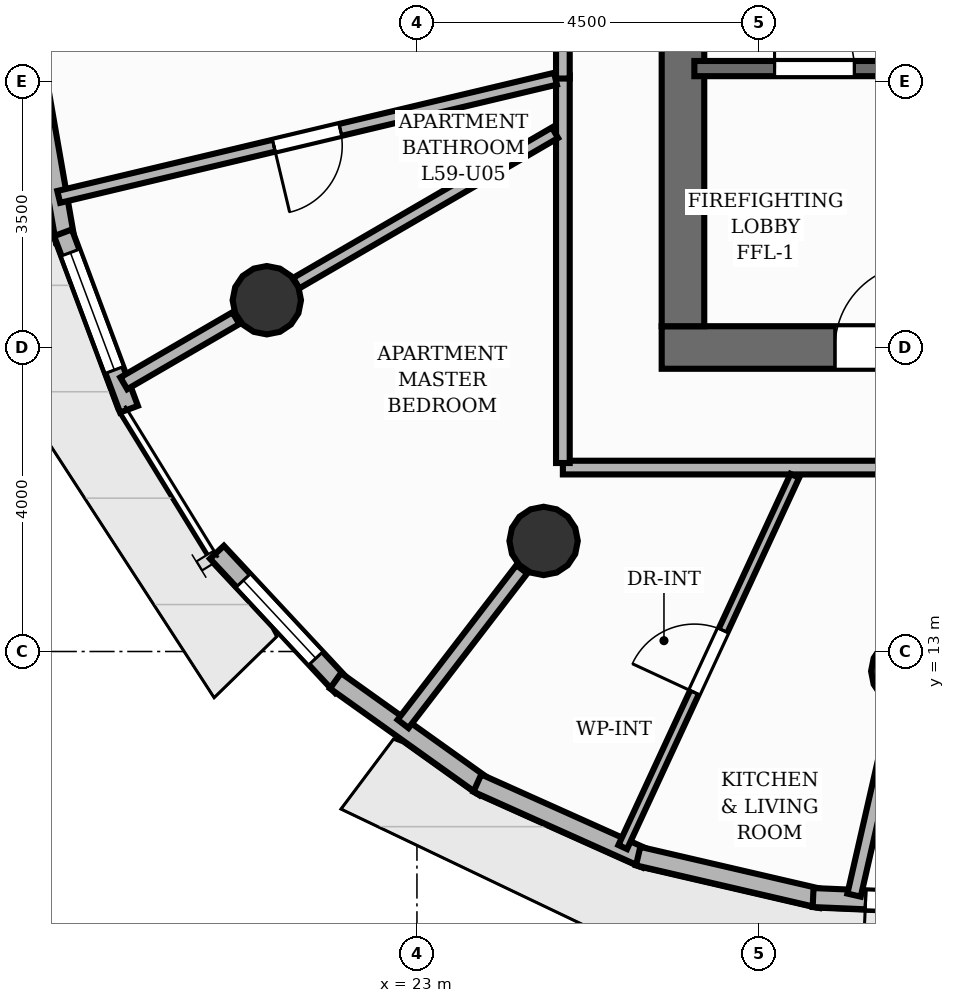
"""IFC4 building model, lengths in metres.
Left out: names, types, materials, properties, quantities, classifications, styles, units other than length and angle.
Written with IfcOpenShell. Run it as: python <this file> out.ifc"""

import sys

from ifc_helpers import new_model, si_unit, direction, frame, frame_2d, origin, origin_2d, place, context, subcontext, project, spatial, rectangle, circle, extrude, element, fill, save


model = new_model("IFC4")
c1 = context("Model", 3, precision=1e-05, world=origin(), true_north=direction((0.0, 1.0)))
c2 = subcontext(c1, "Body", "Model", "MODEL_VIEW")
j1 = project(units=[si_unit("LENGTHUNIT", "METRE"), si_unit("PLANEANGLEUNIT", "RADIAN")], contexts=[c1])
p1 = place(None, origin())
s1 = spatial("IfcSite", under=j1, at=p1, CompositionType="ELEMENT")
p2 = place(p1, origin())
s2 = spatial("IfcBuilding", under=s1, at=p2, CompositionType="ELEMENT")
p3 = place(p2, frame((0.0, 0.0, 198.24)))
s3 = spatial("IfcBuildingStorey", under=s2, at=p3, CompositionType="ELEMENT", Elevation=198.24)
p4 = place(p3, frame((26.22, 17.0, 0.0), z_axis=(0.0, 0.0, 1.0), x_axis=(1.0, 0.0, 0.0)))
e1 = element("IfcWall", 1, at=p4, inside=s3, PredefinedType="SHEAR", context=c2, shape_type="SweptSolid", body=[
    extrude(rectangle(XDim=11.56, YDim=0.56, at=frame_2d((5.78, 0.0))), origin(), (0.0, 0.0, 1.0), 3.2),
])
p5 = place(p4, frame((2.28, 0.0, 0.0)))
e2 = element("IfcOpeningElement", 2, at=p5, cuts=e1, PredefinedType="OPENING", context=c2, shape_type="SweptSolid", body=[
    extrude(rectangle(XDim=1.1, YDim=2.15, at=frame_2d((0.55, 1.075))), frame((0.0, 0.29, 0.0), z_axis=(0.0, -1.0, 0.0), x_axis=(1.0, 0.0, 0.0)), (0.0, 0.0, 1.0), 0.58),
])
p6 = place(p4, frame((5.83, 0.0, 0.0)))
e3 = element("IfcOpeningElement", 3, at=p6, cuts=e1, PredefinedType="OPENING", context=c2, shape_type="SweptSolid", body=[
    extrude(rectangle(XDim=0.9, YDim=2.1, at=frame_2d((0.45, 1.05))), frame((0.0, 0.29, 0.0), z_axis=(0.0, -1.0, 0.0), x_axis=(1.0, 0.0, 0.0)), (0.0, 0.0, 1.0), 0.58),
])
p7 = place(p3, frame((26.5, 17.28, 0.0), z_axis=(0.0, 0.0, 1.0), x_axis=(0.0, 1.0, 0.0)))
e4 = element("IfcWall", 4, at=p7, inside=s3, PredefinedType="SHEAR", context=c2, shape_type="SweptSolid", body=[
    extrude(rectangle(XDim=13.44, YDim=0.56, at=frame_2d((6.72, 0.0))), origin(), (0.0, 0.0, 1.0), 3.2),
])
for number, where, z_axis, x_axis in (
    (5, (21.025, 17.622, 0.0), (0.0, 0.0, 1.0), (1.0, 0.0, 0.0)),
    (6, (24.667, 14.455, 0.0), (0.0, 0.0, 1.0), (1.0, 0.0, 0.0)),
    (7, (29.425, 12.74, 0.0), (0.0, 0.0, 1.0), (1.0, 0.0, 0.0)),
):
    element("IfcColumn", number, at=place(p3, frame(where, z_axis=z_axis, x_axis=x_axis)), inside=s3, PredefinedType="COLUMN", context=c2, shape_type="SweptSolid", body=[
        extrude(circle(Radius=0.45, at=origin_2d()), origin(), (0.0, 0.0, 1.0), 3.2),
    ])
p8 = place(p3, frame((18.373, 18.4, 0.0), z_axis=(0.0, 0.0, 1.0), x_axis=(-0.17143069214, 0.985196182388, 0.0)))
e8 = element("IfcWall", 8, at=p8, inside=s3, PredefinedType="SOLIDWALL", context=c2, shape_type="SweptSolid", body=[
    extrude(rectangle(XDim=2.532, YDim=0.25, at=frame_2d((1.266, 0.0))), origin(), (0.0, 0.0, 1.0), 2.96),
])
p9 = place(p3, frame((19.211, 16.189, 0.0), z_axis=(0.0, 0.0, 1.0), x_axis=(-0.350367491805, 0.93661231077, 0.0)))
e9 = element("IfcWall", 9, at=p9, inside=s3, PredefinedType="SOLIDWALL", context=c2, shape_type="SweptSolid", body=[
    extrude(rectangle(XDim=2.478, YDim=0.25, at=frame_2d((1.239, 0.0))), origin(), (0.0, 0.0, 1.0), 2.96),
])
p10 = place(p9, frame((0.55, 0.0, 0.85)))
e10 = element("IfcOpeningElement", 10, at=p10, cuts=e9, PredefinedType="OPENING", context=c2, shape_type="SweptSolid", body=[
    extrude(rectangle(XDim=1.65, YDim=1.52, at=frame_2d((0.825, 0.76))), frame((0.0, 0.135, 0.0), z_axis=(0.0, -1.0, 0.0), x_axis=(1.0, 0.0, 0.0)), (0.0, 0.0, 1.0), 0.27),
])
p11 = place(p3, frame((22.015, 12.539, 0.0), z_axis=(0.0, 0.0, 1.0), x_axis=(-0.681640731319, 0.731687032417, 0.0)))
e11 = element("IfcWall", 11, at=p11, inside=s3, PredefinedType="SOLIDWALL", context=c2, shape_type="SweptSolid", body=[
    extrude(rectangle(XDim=2.415, YDim=0.25, at=frame_2d((1.208, 0.0))), origin(), (0.0, 0.0, 1.0), 2.96),
])
p12 = place(p11, frame((0.507, 0.0, 0.85)))
e12 = element("IfcOpeningElement", 12, at=p12, cuts=e11, PredefinedType="OPENING", context=c2, shape_type="SweptSolid", body=[
    extrude(rectangle(XDim=1.4, YDim=1.55, at=frame_2d((0.7, 0.775))), frame((0.0, 0.135, 0.0), z_axis=(0.0, -1.0, 0.0), x_axis=(1.0, 0.0, 0.0)), (0.0, 0.0, 1.0), 0.27),
])
p13 = place(p3, frame((23.894, 11.212, 0.0), z_axis=(0.0, 0.0, 1.0), x_axis=(-0.813794949485, 0.581152114504, 0.0)))
e13 = element("IfcWall", 13, at=p13, inside=s3, PredefinedType="SOLIDWALL", context=c2, shape_type="SweptSolid", body=[
    extrude(rectangle(XDim=2.415, YDim=0.25, at=frame_2d((1.208, 0.0))), origin(), (0.0, 0.0, 1.0), 2.96),
])
p14 = place(p3, frame((26.018, 10.271, 0.0), z_axis=(0.0, 0.0, 1.0), x_axis=(-0.912451283158, 0.409185356365, 0.0)))
e14 = element("IfcWall", 14, at=p14, inside=s3, PredefinedType="SOLIDWALL", context=c2, shape_type="SweptSolid", body=[
    extrude(rectangle(XDim=2.437, YDim=0.25, at=frame_2d((1.218, 0.0))), origin(), (0.0, 0.0, 1.0), 2.96),
])
p15 = place(p3, frame((28.324, 9.747, 0.0), z_axis=(0.0, 0.0, 1.0), x_axis=(-0.974096425092, 0.226133046286, 0.0)))
e15 = element("IfcWall", 15, at=p15, inside=s3, PredefinedType="SOLIDWALL", context=c2, shape_type="SweptSolid", body=[
    extrude(rectangle(XDim=2.478, YDim=0.25, at=frame_2d((1.239, 0.0))), origin(), (0.0, 0.0, 1.0), 2.96),
])
p16 = place(p3, frame((30.742, 9.655, 0.0), z_axis=(0.0, 0.0, 1.0), x_axis=(-0.999099670747, 0.042424614469, 0.0)))
e16 = element("IfcWall", 16, at=p16, inside=s3, PredefinedType="SOLIDWALL", context=c2, shape_type="SweptSolid", body=[
    extrude(rectangle(XDim=2.532, YDim=0.25, at=frame_2d((1.266, 0.0))), origin(), (0.0, 0.0, 1.0), 2.96),
])
p17 = place(p16, frame((0.691, 0.0, 0.0)))
e17 = element("IfcOpeningElement", 17, at=p17, cuts=e16, PredefinedType="OPENING", context=c2, shape_type="SweptSolid", body=[
    extrude(rectangle(XDim=1.15, YDim=2.2, at=frame_2d((0.575, 1.1))), frame((0.0, 0.135, 0.0), z_axis=(0.0, -1.0, 0.0), x_axis=(1.0, 0.0, 0.0)), (0.0, 0.0, 1.0), 0.27),
])
p18 = place(p3, frame((26.65, 20.67, 0.0), z_axis=(0.0, 0.0, 1.0), x_axis=(1.0, 0.0, 0.0)))
e18 = element("IfcWall", 18, at=p18, inside=s3, PredefinedType="SHEAR", context=c2, shape_type="SweptSolid", body=[
    extrude(rectangle(XDim=3.24, YDim=0.2, at=frame_2d((1.62, 0.0))), origin(), (0.0, 0.0, 1.0), 3.2),
])
p19 = place(p18, frame((1.055, 0.0, 0.0)))
e19 = element("IfcOpeningElement", 19, at=p19, cuts=e18, PredefinedType="OPENING", context=c2, shape_type="SweptSolid", body=[
    extrude(rectangle(XDim=1.05, YDim=2.15, at=frame_2d((0.525, 1.075))), frame((0.0, 0.11, 0.0), z_axis=(0.0, -1.0, 0.0), x_axis=(1.0, 0.0, 0.0)), (0.0, 0.0, 1.0), 0.22),
])
p20 = place(p3, frame((20.618, 17.386, 0.0), z_axis=(0.0, 0.0, 1.0), x_axis=(-0.864618511529, -0.502428929821, 0.0)))
e20 = element("IfcWall", 20, at=p20, inside=s3, PredefinedType="PARTITIONING", context=c2, shape_type="SweptSolid", body=[
    extrude(rectangle(XDim=1.706, YDim=0.18, at=frame_2d((0.853, 0.0))), origin(), (0.0, 0.0, 1.0), 2.403),
])
p21 = place(p3, frame((24.38, 14.082, 0.0), z_axis=(0.0, 0.0, 1.0), x_axis=(-0.60921849036, -0.79300241551, 0.0)))
e21 = element("IfcWall", 21, at=p21, inside=s3, PredefinedType="PARTITIONING", context=c2, shape_type="SweptSolid", body=[
    extrude(rectangle(XDim=2.565, YDim=0.18, at=frame_2d((1.283, 0.0))), origin(), (0.0, 0.0, 1.0), 2.403),
])
p22 = place(p3, frame((29.32, 12.282, 0.0), z_axis=(0.0, 0.0, 1.0), x_axis=(-0.22299363946, -0.974819899654, 0.0)))
e22 = element("IfcWall", 22, at=p22, inside=s3, PredefinedType="PARTITIONING", context=c2, shape_type="SweptSolid", body=[
    extrude(rectangle(XDim=2.552, YDim=0.18, at=frame_2d((1.276, 0.0))), origin(), (0.0, 0.0, 1.0), 2.403),
])
p23 = place(p3, frame((39.08, 15.42, 0.0), z_axis=(0.0, 0.0, 1.0), x_axis=(-1.0, 0.0, 0.0)))
e23 = element("IfcWall", 23, at=p23, inside=s3, PredefinedType="PARTITIONING", context=c2, shape_type="SweptSolid", body=[
    extrude(rectangle(XDim=14.16, YDim=0.18, at=frame_2d((7.08, 0.0))), origin(), (0.0, 0.0, 1.0), 2.955),
])
p24 = place(p23, frame((8.155, 0.0, 0.0)))
e24 = element("IfcOpeningElement", 24, at=p24, cuts=e23, PredefinedType="OPENING", context=c2, shape_type="SweptSolid", body=[
    extrude(rectangle(XDim=1.05, YDim=2.15, at=frame_2d((0.525, 1.075))), frame((0.0, 0.1, 0.0), z_axis=(0.0, -1.0, 0.0), x_axis=(1.0, 0.0, 0.0)), (0.0, 0.0, 1.0), 0.2),
])
p25 = place(p3, frame((24.92, 15.48, 0.0), z_axis=(0.0, 0.0, 1.0), x_axis=(0.0, 1.0, 0.0)))
e25 = element("IfcWall", 25, at=p25, inside=s3, PredefinedType="PARTITIONING", context=c2, shape_type="SweptSolid", body=[
    extrude(rectangle(XDim=5.1, YDim=0.18, at=frame_2d((2.55, 0.0))), origin(), (0.0, 0.0, 1.0), 2.955),
])
p26 = place(p3, frame((24.92, 20.539, 0.0), z_axis=(0.0, 0.0, 1.0), x_axis=(0.0, 1.0, 0.0)))
e26 = element("IfcWall", 26, at=p26, inside=s3, PredefinedType="PARTITIONING", context=c2, shape_type="SweptSolid", body=[
    extrude(rectangle(XDim=1.061, YDim=0.18, at=frame_2d((0.531, 0.0))), origin(), (0.0, 0.0, 1.0), 2.955),
])
p27 = place(p3, frame((25.708, 10.427, 0.0), z_axis=(0.0, 0.0, 1.0), x_axis=(0.420587579127, 0.907251943114, 0.0)))
e27 = element("IfcWall", 27, at=p27, inside=s3, PredefinedType="PARTITIONING", context=c2, shape_type="SweptSolid", body=[
    extrude(rectangle(XDim=5.383, YDim=0.125, at=frame_2d((2.692, 0.0))), origin(), (0.0, 0.0, 1.0), 2.955),
])
p28 = place(p27, frame((2.242, 0.0, 0.0)))
e28 = element("IfcOpeningElement", 28, at=p28, cuts=e27, PredefinedType="OPENING", context=c2, shape_type="SweptSolid", body=[
    extrude(rectangle(XDim=0.9, YDim=2.1, at=frame_2d((0.45, 1.05))), frame((0.0, 0.073, 0.0), z_axis=(0.0, -1.0, 0.0), x_axis=(1.0, 0.0, 0.0)), (0.0, 0.0, 1.0), 0.145),
])
p29 = place(p3, frame((21.412, 17.847, 0.0), z_axis=(0.0, 0.0, 1.0), x_axis=(0.864603029318, 0.502455571861, 0.0)))
e29 = element("IfcWall", 29, at=p29, inside=s3, PredefinedType="PLUMBINGWALL", context=c2, shape_type="SweptSolid", body=[
    extrude(rectangle(XDim=3.938, YDim=0.16, at=frame_2d((1.969, 0.0))), origin(), (0.0, 0.0, 1.0), 2.403),
])
p30 = place(p3, frame((24.823, 20.536, 0.0), z_axis=(0.0, 0.0, 1.0), x_axis=(-0.972855711428, -0.231412542317, 0.0)))
e30 = element("IfcWall", 30, at=p30, inside=s3, PredefinedType="PLUMBINGWALL", context=c2, shape_type="SweptSolid", body=[
    extrude(rectangle(XDim=6.718, YDim=0.16, at=frame_2d((3.359, 0.0))), origin(), (0.0, 0.0, 1.0), 2.692),
])
p31 = place(p30, frame((2.909, 0.0, 0.0)))
e31 = element("IfcOpeningElement", 31, at=p31, cuts=e30, PredefinedType="OPENING", context=c2, shape_type="SweptSolid", body=[
    extrude(rectangle(XDim=0.9, YDim=2.1, at=frame_2d((0.45, 1.05))), frame((0.0, 0.09, 0.0), z_axis=(0.0, -1.0, 0.0), x_axis=(1.0, 0.0, 0.0)), (0.0, 0.0, 1.0), 0.18),
])
p32 = place(p17, origin())
e32 = element("IfcDoor", 32, at=p32, inside=s3, OperationType="SINGLE_SWING_RIGHT", PredefinedType="DOOR", context=c2, shape_type="SweptSolid", body=[
    extrude(rectangle(XDim=1.15, YDim=2.2, at=frame_2d((0.575, 1.1))), frame((0.0, 0.025, 0.0), z_axis=(0.0, -1.0, 0.0), x_axis=(1.0, 0.0, 0.0)), (0.0, 0.0, 1.0), 0.05),
])
fill(e17, e32)
p33 = place(p10, origin())
e33 = element("IfcWindow", 33, at=p33, inside=s3, PartitioningType="SINGLE_PANEL", PredefinedType="WINDOW", context=c2, shape_type="SweptSolid", body=[
    extrude(rectangle(XDim=1.65, YDim=1.52, at=frame_2d((0.825, 0.76))), frame((0.0, 0.03, 0.0), z_axis=(0.0, -1.0, 0.0), x_axis=(1.0, 0.0, 0.0)), (0.0, 0.0, 1.0), 0.06),
])
fill(e10, e33)
p34 = place(p12, origin())
e34 = element("IfcWindow", 34, at=p34, inside=s3, PartitioningType="SINGLE_PANEL", PredefinedType="WINDOW", context=c2, shape_type="SweptSolid", body=[
    extrude(rectangle(XDim=1.4, YDim=1.55, at=frame_2d((0.7, 0.775))), frame((0.0, 0.03, 0.0), z_axis=(0.0, -1.0, 0.0), x_axis=(1.0, 0.0, 0.0)), (0.0, 0.0, 1.0), 0.06),
])
fill(e12, e34)
p35 = place(p19, origin())
e35 = element("IfcDoor", 35, at=p35, inside=s3, OperationType="SINGLE_SWING_LEFT", PredefinedType="DOOR", context=c2, shape_type="SweptSolid", body=[
    extrude(rectangle(XDim=1.05, YDim=2.15, at=frame_2d((0.525, 1.075))), frame((0.0, 0.025, 0.0), z_axis=(0.0, -1.0, 0.0), x_axis=(1.0, 0.0, 0.0)), (0.0, 0.0, 1.0), 0.05),
])
fill(e19, e35)
p36 = place(p5, origin())
e36 = element("IfcDoor", 36, at=p36, inside=s3, OperationType="SINGLE_SWING_RIGHT", PredefinedType="DOOR", context=c2, shape_type="SweptSolid", body=[
    extrude(rectangle(XDim=1.1, YDim=2.15, at=frame_2d((0.55, 1.075))), frame((0.0, 0.025, 0.0), z_axis=(0.0, -1.0, 0.0), x_axis=(1.0, 0.0, 0.0)), (0.0, 0.0, 1.0), 0.05),
])
fill(e2, e36)
p37 = place(p28, origin())
e37 = element("IfcDoor", 37, at=p37, inside=s3, OperationType="SINGLE_SWING_LEFT", PredefinedType="DOOR", context=c2, shape_type="SweptSolid", body=[
    extrude(rectangle(XDim=0.9, YDim=2.1, at=frame_2d((0.45, 1.05))), frame((0.0, 0.025, 0.0), z_axis=(0.0, -1.0, 0.0), x_axis=(1.0, 0.0, 0.0)), (0.0, 0.0, 1.0), 0.05),
])
fill(e28, e37)
p38 = place(p31, origin())
e38 = element("IfcDoor", 38, at=p38, inside=s3, OperationType="SINGLE_SWING_RIGHT", PredefinedType="DOOR", context=c2, shape_type="SweptSolid", body=[
    extrude(rectangle(XDim=0.9, YDim=2.1, at=frame_2d((0.45, 1.05))), frame((0.0, 0.025, 0.0), z_axis=(0.0, -1.0, 0.0), x_axis=(1.0, 0.0, 0.0)), (0.0, 0.0, 1.0), 0.05),
])
fill(e31, e38)
save(model, sys.argv[1])
